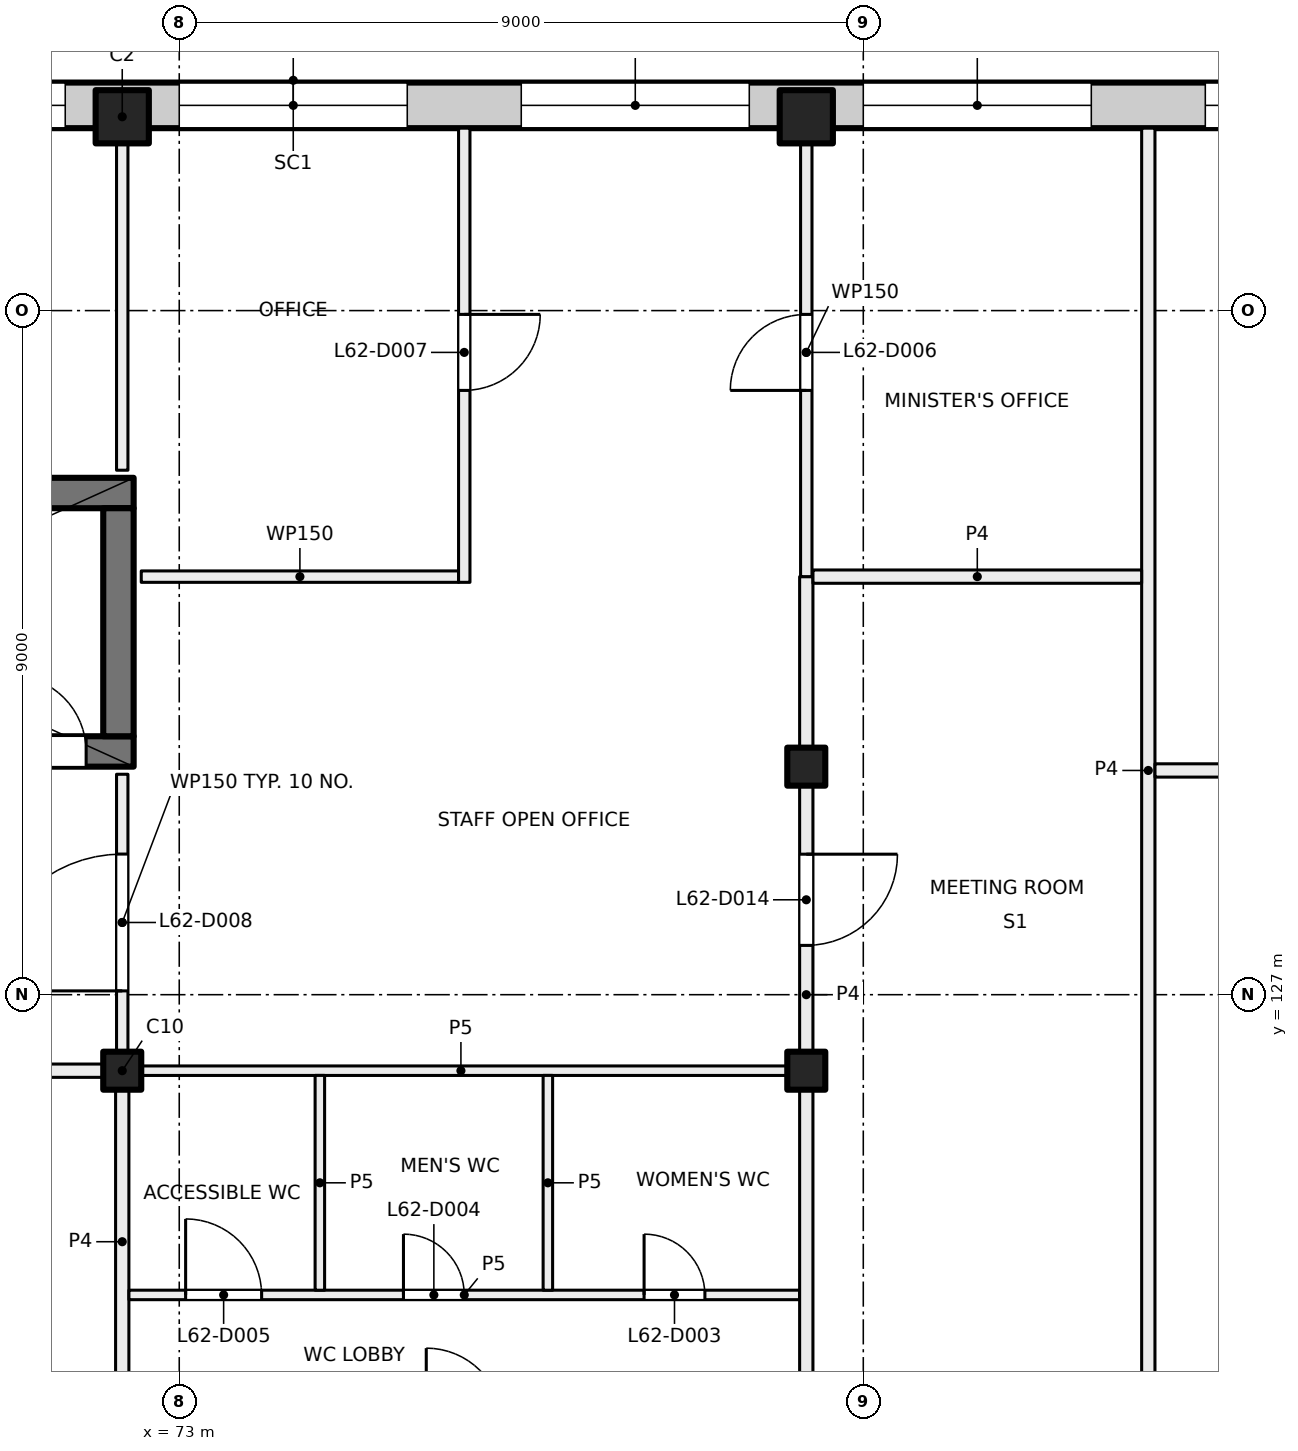
"""IFC4 building model, lengths in metres.
Left out: names, types, materials, properties, quantities, classifications, styles, units other than length and angle.
Written with IfcOpenShell. Run it as: python <this file> out.ifc"""

import sys

from ifc_helpers import new_model, si_unit, direction, frame, frame_2d, origin, origin_2d, place, context, subcontext, project, spatial, rectangle, extrude, element, fill, save


model = new_model("IFC4")
c1 = context("Model", 3, precision=1e-05, world=origin(), true_north=direction((0.0, 1.0)))
c2 = subcontext(c1, "Body", "Model", "MODEL_VIEW")
j1 = project(units=[si_unit("LENGTHUNIT", "METRE"), si_unit("PLANEANGLEUNIT", "RADIAN")], contexts=[c1])
p1 = place(None, origin())
s1 = spatial("IfcSite", under=j1, at=p1, CompositionType="ELEMENT")
p2 = place(p1, origin())
s2 = spatial("IfcBuilding", under=s1, at=p2, CompositionType="ELEMENT")
p3 = place(p2, frame((0.0, 0.0, 261.5)))
s3 = spatial("IfcBuildingStorey", under=s2, at=p3, CompositionType="ELEMENT", Elevation=261.5)
for number, where, z_axis, x_axis in (
    (1, (81.25, 130.0, 0.0), (0.0, 0.0, 1.0), (1.0, 0.0, 0.0)),
    (2, (72.25, 126.0, 0.0), (0.0, 0.0, 1.0), (1.0, 0.0, 0.0)),
    (3, (81.25, 126.0, 0.0), (0.0, 0.0, 1.0), (1.0, 0.0, 0.0)),
):
    element("IfcColumn", number, at=place(p3, frame(where, z_axis=z_axis, x_axis=x_axis)), inside=s3, PredefinedType="COLUMN", context=c2, shape_type="SweptSolid", body=[
        extrude(rectangle(XDim=0.5, YDim=0.5, at=origin_2d()), origin(), (0.0, 0.0, 1.0), 4.0),
    ])
for number, where, z_axis, x_axis in (
    (4, (72.25, 138.55, 0.0), (0.0, 0.0, 1.0), (1.0, 0.0, 0.0)),
    (5, (81.25, 138.55, 0.0), (0.0, 0.0, 1.0), (1.0, 0.0, 0.0)),
):
    element("IfcColumn", number, at=place(p3, frame(where, z_axis=z_axis, x_axis=x_axis)), inside=s3, PredefinedType="COLUMN", context=c2, shape_type="SweptSolid", body=[
        extrude(rectangle(XDim=0.7, YDim=0.7, at=origin_2d()), origin(), (0.0, 0.0, 1.0), 4.0),
    ])
p4 = place(p3, frame((63.5, 130.2, 0.0), z_axis=(0.0, 0.0, 1.0), x_axis=(1.0, 0.0, 0.0)))
e6 = element("IfcWall", 6, at=p4, inside=s3, PredefinedType="SHEAR", context=c2, shape_type="SweptSolid", body=[
    extrude(rectangle(XDim=8.9, YDim=0.4, at=frame_2d((4.45, 0.0))), origin(), (0.0, 0.0, 1.0), 4.0),
])
p5 = place(p4, frame((7.275, 0.0, 0.0)))
e7 = element("IfcOpeningElement", 7, at=p5, cuts=e6, PredefinedType="OPENING", context=c2, shape_type="SweptSolid", body=[
    extrude(rectangle(XDim=1.0, YDim=2.1, at=frame_2d((0.5, 1.05))), frame((0.0, 0.21, 0.0), z_axis=(0.0, -1.0, 0.0), x_axis=(1.0, 0.0, 0.0)), (0.0, 0.0, 1.0), 0.42),
])
p6 = place(p3, frame((64.0, 133.6, 0.0), z_axis=(0.0, 0.0, 1.0), x_axis=(1.0, 0.0, 0.0)))
e8 = element("IfcWall", 8, at=p6, inside=s3, PredefinedType="SHEAR", context=c2, shape_type="SweptSolid", body=[
    extrude(rectangle(XDim=8.4, YDim=0.4, at=frame_2d((4.2, 0.0))), origin(), (0.0, 0.0, 1.0), 4.0),
])
p7 = place(p3, frame((72.2, 130.4, 0.0), z_axis=(0.0, 0.0, 1.0), x_axis=(0.0, 1.0, 0.0)))
e9 = element("IfcWall", 9, at=p7, inside=s3, PredefinedType="SHEAR", context=c2, shape_type="SweptSolid", body=[
    extrude(rectangle(XDim=3.0, YDim=0.4, at=frame_2d((1.5, 0.0))), origin(), (0.0, 0.0, 1.0), 4.0),
])
p8 = place(p3, frame((47.07, 138.7, 0.0), z_axis=(0.0, 0.0, 1.0), x_axis=(1.0, 0.0, 0.0)))
e10 = element("IfcWall", 10, at=p8, inside=s3, PredefinedType="SOLIDWALL", context=c2, shape_type="SweptSolid", body=[
    extrude(rectangle(XDim=43.91, YDim=0.6, at=frame_2d((21.955, 0.0))), origin(), (0.0, 0.0, 1.0), 3.625),
])
p9 = place(p8, frame((3.43, 0.0, 0.9)))
e11 = element("IfcOpeningElement", 11, at=p9, cuts=e10, PredefinedType="OPENING", context=c2, shape_type="SweptSolid", body=[
    extrude(rectangle(XDim=3.0, YDim=2.4, at=frame_2d((1.5, 1.2))), frame((0.0, 0.31, 0.0), z_axis=(0.0, -1.0, 0.0), x_axis=(1.0, 0.0, 0.0)), (0.0, 0.0, 1.0), 0.62),
])
p10 = place(p8, frame((7.93, 0.0, 0.9)))
e12 = element("IfcOpeningElement", 12, at=p10, cuts=e10, PredefinedType="OPENING", context=c2, shape_type="SweptSolid", body=[
    extrude(rectangle(XDim=3.0, YDim=2.4, at=frame_2d((1.5, 1.2))), frame((0.0, 0.31, 0.0), z_axis=(0.0, -1.0, 0.0), x_axis=(1.0, 0.0, 0.0)), (0.0, 0.0, 1.0), 0.62),
])
p11 = place(p8, frame((12.43, 0.0, 0.9)))
e13 = element("IfcOpeningElement", 13, at=p11, cuts=e10, PredefinedType="OPENING", context=c2, shape_type="SweptSolid", body=[
    extrude(rectangle(XDim=3.0, YDim=2.4, at=frame_2d((1.5, 1.2))), frame((0.0, 0.31, 0.0), z_axis=(0.0, -1.0, 0.0), x_axis=(1.0, 0.0, 0.0)), (0.0, 0.0, 1.0), 0.62),
])
p12 = place(p8, frame((16.93, 0.0, 0.9)))
e14 = element("IfcOpeningElement", 14, at=p12, cuts=e10, PredefinedType="OPENING", context=c2, shape_type="SweptSolid", body=[
    extrude(rectangle(XDim=3.0, YDim=2.4, at=frame_2d((1.5, 1.2))), frame((0.0, 0.31, 0.0), z_axis=(0.0, -1.0, 0.0), x_axis=(1.0, 0.0, 0.0)), (0.0, 0.0, 1.0), 0.62),
])
p13 = place(p8, frame((21.43, 0.0, 0.9)))
e15 = element("IfcOpeningElement", 15, at=p13, cuts=e10, PredefinedType="OPENING", context=c2, shape_type="SweptSolid", body=[
    extrude(rectangle(XDim=3.0, YDim=2.4, at=frame_2d((1.5, 1.2))), frame((0.0, 0.31, 0.0), z_axis=(0.0, -1.0, 0.0), x_axis=(1.0, 0.0, 0.0)), (0.0, 0.0, 1.0), 0.62),
])
p14 = place(p8, frame((25.93, 0.0, 0.9)))
e16 = element("IfcOpeningElement", 16, at=p14, cuts=e10, PredefinedType="OPENING", context=c2, shape_type="SweptSolid", body=[
    extrude(rectangle(XDim=3.0, YDim=2.4, at=frame_2d((1.5, 1.2))), frame((0.0, 0.31, 0.0), z_axis=(0.0, -1.0, 0.0), x_axis=(1.0, 0.0, 0.0)), (0.0, 0.0, 1.0), 0.62),
])
p15 = place(p8, frame((30.43, 0.0, 0.9)))
e17 = element("IfcOpeningElement", 17, at=p15, cuts=e10, PredefinedType="OPENING", context=c2, shape_type="SweptSolid", body=[
    extrude(rectangle(XDim=3.0, YDim=2.4, at=frame_2d((1.5, 1.2))), frame((0.0, 0.31, 0.0), z_axis=(0.0, -1.0, 0.0), x_axis=(1.0, 0.0, 0.0)), (0.0, 0.0, 1.0), 0.62),
])
p16 = place(p8, frame((34.93, 0.0, 0.9)))
e18 = element("IfcOpeningElement", 18, at=p16, cuts=e10, PredefinedType="OPENING", context=c2, shape_type="SweptSolid", body=[
    extrude(rectangle(XDim=3.0, YDim=2.4, at=frame_2d((1.5, 1.2))), frame((0.0, 0.31, 0.0), z_axis=(0.0, -1.0, 0.0), x_axis=(1.0, 0.0, 0.0)), (0.0, 0.0, 1.0), 0.62),
])
p17 = place(p8, frame((39.43, 0.0, 0.9)))
e19 = element("IfcOpeningElement", 19, at=p17, cuts=e10, PredefinedType="OPENING", context=c2, shape_type="SweptSolid", body=[
    extrude(rectangle(XDim=3.0, YDim=2.4, at=frame_2d((1.5, 1.2))), frame((0.0, 0.31, 0.0), z_axis=(0.0, -1.0, 0.0), x_axis=(1.0, 0.0, 0.0)), (0.0, 0.0, 1.0), 0.62),
])
p18 = place(p3, frame((72.25, 121.5, 0.0), z_axis=(0.0, 0.0, 1.0), x_axis=(0.0, 1.0, 0.0)))
e20 = element("IfcWall", 20, at=p18, inside=s3, PredefinedType="PARTITIONING", context=c2, shape_type="SweptSolid", body=[
    extrude(rectangle(XDim=4.5, YDim=0.175, at=frame_2d((2.25, 0.0))), origin(), (0.0, 0.0, 1.0), 3.625),
])
p19 = place(p3, frame((72.338, 123.05, 0.0), z_axis=(0.0, 0.0, 1.0), x_axis=(1.0, 0.0, 0.0)))
e21 = element("IfcWall", 21, at=p19, inside=s3, PredefinedType="PARTITIONING", context=c2, shape_type="SweptSolid", body=[
    extrude(rectangle(XDim=8.824, YDim=0.125, at=frame_2d((4.412, 0.0))), origin(), (0.0, 0.0, 1.0), 3.625),
])
p20 = place(p19, frame((6.778, 0.0, 0.0)))
e22 = element("IfcOpeningElement", 22, at=p20, cuts=e21, PredefinedType="OPENING", context=c2, shape_type="SweptSolid", body=[
    extrude(rectangle(XDim=0.8, YDim=2.1, at=frame_2d((0.4, 1.05))), frame((0.0, 0.073, 0.0), z_axis=(0.0, -1.0, 0.0), x_axis=(1.0, 0.0, 0.0)), (0.0, 0.0, 1.0), 0.145),
])
p21 = place(p19, frame((3.612, 0.0, 0.0)))
e23 = element("IfcOpeningElement", 23, at=p21, cuts=e21, PredefinedType="OPENING", context=c2, shape_type="SweptSolid", body=[
    extrude(rectangle(XDim=0.8, YDim=2.1, at=frame_2d((0.4, 1.05))), frame((0.0, 0.073, 0.0), z_axis=(0.0, -1.0, 0.0), x_axis=(1.0, 0.0, 0.0)), (0.0, 0.0, 1.0), 0.145),
])
p22 = place(p19, frame((0.746, 0.0, 0.0)))
e24 = element("IfcOpeningElement", 24, at=p22, cuts=e21, PredefinedType="OPENING", context=c2, shape_type="SweptSolid", body=[
    extrude(rectangle(XDim=1.0, YDim=2.1, at=frame_2d((0.5, 1.05))), frame((0.0, 0.073, 0.0), z_axis=(0.0, -1.0, 0.0), x_axis=(1.0, 0.0, 0.0)), (0.0, 0.0, 1.0), 0.145),
])
p23 = place(p3, frame((72.25, 126.0, 0.0), z_axis=(0.0, 0.0, 1.0), x_axis=(-1.0, 0.0, 0.0)))
e25 = element("IfcWall", 25, at=p23, inside=s3, PredefinedType="PARTITIONING", context=c2, shape_type="SweptSolid", body=[
    extrude(rectangle(XDim=9.088, YDim=0.175, at=frame_2d((4.544, 0.0))), origin(), (0.0, 0.0, 1.0), 3.625),
])
p24 = place(p3, frame((72.25, 126.0, 0.0), z_axis=(0.0, 0.0, 1.0), x_axis=(0.0, 1.0, 0.0)))
e26 = element("IfcWall", 26, at=p24, inside=s3, PredefinedType="PARTITIONING", context=c2, shape_type="SweptSolid", body=[
    extrude(rectangle(XDim=3.9, YDim=0.15, at=frame_2d((1.95, 0.0))), origin(), (0.0, 0.0, 1.0), 3.625),
])
p25 = place(p24, frame((1.05, 0.0, 0.0)))
e27 = element("IfcOpeningElement", 27, at=p25, cuts=e26, PredefinedType="OPENING", context=c2, shape_type="SweptSolid", body=[
    extrude(rectangle(XDim=1.8, YDim=2.1, at=frame_2d((0.9, 1.05))), frame((0.0, 0.085, 0.0), z_axis=(0.0, -1.0, 0.0), x_axis=(1.0, 0.0, 0.0)), (0.0, 0.0, 1.0), 0.17),
])
p26 = place(p3, frame((72.25, 126.0, 0.0), z_axis=(0.0, 0.0, 1.0), x_axis=(1.0, 0.0, 0.0)))
e28 = element("IfcWall", 28, at=p26, inside=s3, PredefinedType="PARTITIONING", context=c2, shape_type="SweptSolid", body=[
    extrude(rectangle(XDim=8.912, YDim=0.125, at=frame_2d((4.456, 0.0))), origin(), (0.0, 0.0, 1.0), 3.625),
])
p27 = place(p3, frame((72.25, 133.9, 0.0), z_axis=(0.0, 0.0, 1.0), x_axis=(0.0, 1.0, 0.0)))
e29 = element("IfcWall", 29, at=p27, inside=s3, PredefinedType="PARTITIONING", context=c2, shape_type="SweptSolid", body=[
    extrude(rectangle(XDim=4.5, YDim=0.15, at=frame_2d((2.25, 0.0))), origin(), (0.0, 0.0, 1.0), 3.625),
])
p28 = place(p3, frame((74.85, 125.938, 0.0), z_axis=(0.0, 0.0, 1.0), x_axis=(0.0, -1.0, 0.0)))
e30 = element("IfcWall", 30, at=p28, inside=s3, PredefinedType="PARTITIONING", context=c2, shape_type="SweptSolid", body=[
    extrude(rectangle(XDim=2.826, YDim=0.125, at=frame_2d((1.413, 0.0))), origin(), (0.0, 0.0, 1.0), 3.625),
])
p29 = place(p3, frame((76.675, 132.5, 0.0), z_axis=(0.0, 0.0, 1.0), x_axis=(-1.0, 0.0, 0.0)))
e31 = element("IfcWall", 31, at=p29, inside=s3, PredefinedType="PARTITIONING", context=c2, shape_type="SweptSolid", body=[
    extrude(rectangle(XDim=4.175, YDim=0.15, at=frame_2d((2.087, 0.0))), origin(), (0.0, 0.0, 1.0), 3.625),
])
p30 = place(p3, frame((76.75, 138.4, 0.0), z_axis=(0.0, 0.0, 1.0), x_axis=(0.0, -1.0, 0.0)))
e32 = element("IfcWall", 32, at=p30, inside=s3, PredefinedType="PARTITIONING", context=c2, shape_type="SweptSolid", body=[
    extrude(rectangle(XDim=5.975, YDim=0.15, at=frame_2d((2.987, 0.0))), origin(), (0.0, 0.0, 1.0), 3.625),
])
p31 = place(p30, frame((2.45, 0.0, 0.0)))
e33 = element("IfcOpeningElement", 33, at=p31, cuts=e32, PredefinedType="OPENING", context=c2, shape_type="SweptSolid", body=[
    extrude(rectangle(XDim=1.0, YDim=2.1, at=frame_2d((0.5, 1.05))), frame((0.0, 0.085, 0.0), z_axis=(0.0, -1.0, 0.0), x_axis=(1.0, 0.0, 0.0)), (0.0, 0.0, 1.0), 0.17),
])
p32 = place(p3, frame((77.85, 125.938, 0.0), z_axis=(0.0, 0.0, 1.0), x_axis=(0.0, -1.0, 0.0)))
e34 = element("IfcWall", 34, at=p32, inside=s3, PredefinedType="PARTITIONING", context=c2, shape_type="SweptSolid", body=[
    extrude(rectangle(XDim=2.826, YDim=0.125, at=frame_2d((1.413, 0.0))), origin(), (0.0, 0.0, 1.0), 3.625),
])
p33 = place(p3, frame((81.25, 132.5, 0.0), z_axis=(0.0, 0.0, 1.0), x_axis=(0.0, -1.0, 0.0)))
e35 = element("IfcWall", 35, at=p33, inside=s3, PredefinedType="PARTITIONING", context=c2, shape_type="SweptSolid", body=[
    extrude(rectangle(XDim=11.0, YDim=0.175, at=frame_2d((5.5, 0.0))), origin(), (0.0, 0.0, 1.0), 3.625),
])
p34 = place(p33, frame((3.652, 0.0, 0.0)))
e36 = element("IfcOpeningElement", 36, at=p34, cuts=e35, PredefinedType="OPENING", context=c2, shape_type="SweptSolid", body=[
    extrude(rectangle(XDim=1.2, YDim=2.1, at=frame_2d((0.6, 1.05))), frame((0.0, 0.097, 0.0), z_axis=(0.0, -1.0, 0.0), x_axis=(1.0, 0.0, 0.0)), (0.0, 0.0, 1.0), 0.195),
])
p35 = place(p3, frame((81.25, 132.5, 0.0), z_axis=(0.0, 0.0, 1.0), x_axis=(0.0, 1.0, 0.0)))
e37 = element("IfcWall", 37, at=p35, inside=s3, PredefinedType="PARTITIONING", context=c2, shape_type="SweptSolid", body=[
    extrude(rectangle(XDim=5.9, YDim=0.15, at=frame_2d((2.95, 0.0))), origin(), (0.0, 0.0, 1.0), 3.625),
])
p36 = place(p35, frame((2.45, 0.0, 0.0)))
e38 = element("IfcOpeningElement", 38, at=p36, cuts=e37, PredefinedType="OPENING", context=c2, shape_type="SweptSolid", body=[
    extrude(rectangle(XDim=1.0, YDim=2.1, at=frame_2d((0.5, 1.05))), frame((0.0, 0.085, 0.0), z_axis=(0.0, -1.0, 0.0), x_axis=(1.0, 0.0, 0.0)), (0.0, 0.0, 1.0), 0.17),
])
p37 = place(p3, frame((85.75, 121.5, 0.0), z_axis=(0.0, 0.0, 1.0), x_axis=(0.0, 1.0, 0.0)))
e39 = element("IfcWall", 39, at=p37, inside=s3, PredefinedType="PARTITIONING", context=c2, shape_type="SweptSolid", body=[
    extrude(rectangle(XDim=16.9, YDim=0.175, at=frame_2d((8.45, 0.0))), origin(), (0.0, 0.0, 1.0), 3.625),
])
p38 = place(p3, frame((85.662, 132.5, 0.0), z_axis=(0.0, 0.0, 1.0), x_axis=(-1.0, 0.0, 0.0)))
e40 = element("IfcWall", 40, at=p38, inside=s3, PredefinedType="PARTITIONING", context=c2, shape_type="SweptSolid", body=[
    extrude(rectangle(XDim=4.324, YDim=0.175, at=frame_2d((2.162, 0.0))), origin(), (0.0, 0.0, 1.0), 3.625),
])
p39 = place(p3, frame((85.838, 129.95, 0.0), z_axis=(0.0, 0.0, 1.0), x_axis=(1.0, 0.0, 0.0)))
e41 = element("IfcWall", 41, at=p39, inside=s3, PredefinedType="PARTITIONING", context=c2, shape_type="SweptSolid", body=[
    extrude(rectangle(XDim=5.162, YDim=0.175, at=frame_2d((2.581, 0.0))), origin(), (0.0, 0.0, 1.0), 3.625),
])
p40 = place(p39, frame((1.971, 0.0, 0.0)))
e42 = element("IfcOpeningElement", 42, at=p40, cuts=e41, PredefinedType="OPENING", context=c2, shape_type="SweptSolid", body=[
    extrude(rectangle(XDim=1.2, YDim=2.1, at=frame_2d((0.6, 1.05))), frame((0.0, 0.097, 0.0), z_axis=(0.0, -1.0, 0.0), x_axis=(1.0, 0.0, 0.0)), (0.0, 0.0, 1.0), 0.195),
])
p41 = place(p13, origin())
e43 = element("IfcWindow", 43, at=p41, inside=s3, PartitioningType="SINGLE_PANEL", PredefinedType="WINDOW", context=c2, shape_type="SweptSolid", body=[
    extrude(rectangle(XDim=3.0, YDim=2.4, at=frame_2d((1.5, 1.2))), frame((0.0, 0.03, 0.0), z_axis=(0.0, -1.0, 0.0), x_axis=(1.0, 0.0, 0.0)), (0.0, 0.0, 1.0), 0.06),
])
fill(e15, e43)
p42 = place(p14, origin())
e44 = element("IfcWindow", 44, at=p42, inside=s3, PartitioningType="SINGLE_PANEL", PredefinedType="WINDOW", context=c2, shape_type="SweptSolid", body=[
    extrude(rectangle(XDim=3.0, YDim=2.4, at=frame_2d((1.5, 1.2))), frame((0.0, 0.03, 0.0), z_axis=(0.0, -1.0, 0.0), x_axis=(1.0, 0.0, 0.0)), (0.0, 0.0, 1.0), 0.06),
])
fill(e16, e44)
p43 = place(p15, origin())
e45 = element("IfcWindow", 45, at=p43, inside=s3, PartitioningType="SINGLE_PANEL", PredefinedType="WINDOW", context=c2, shape_type="SweptSolid", body=[
    extrude(rectangle(XDim=3.0, YDim=2.4, at=frame_2d((1.5, 1.2))), frame((0.0, 0.03, 0.0), z_axis=(0.0, -1.0, 0.0), x_axis=(1.0, 0.0, 0.0)), (0.0, 0.0, 1.0), 0.06),
])
fill(e17, e45)
p44 = place(p16, origin())
e46 = element("IfcWindow", 46, at=p44, inside=s3, PartitioningType="SINGLE_PANEL", PredefinedType="WINDOW", context=c2, shape_type="SweptSolid", body=[
    extrude(rectangle(XDim=3.0, YDim=2.4, at=frame_2d((1.5, 1.2))), frame((0.0, 0.03, 0.0), z_axis=(0.0, -1.0, 0.0), x_axis=(1.0, 0.0, 0.0)), (0.0, 0.0, 1.0), 0.06),
])
fill(e18, e46)
p45 = place(p17, origin())
e47 = element("IfcWindow", 47, at=p45, inside=s3, PartitioningType="SINGLE_PANEL", PredefinedType="WINDOW", context=c2, shape_type="SweptSolid", body=[
    extrude(rectangle(XDim=3.0, YDim=2.4, at=frame_2d((1.5, 1.2))), frame((0.0, 0.03, 0.0), z_axis=(0.0, -1.0, 0.0), x_axis=(1.0, 0.0, 0.0)), (0.0, 0.0, 1.0), 0.06),
])
fill(e19, e47)
p46 = place(p5, origin())
e48 = element("IfcDoor", 48, at=p46, inside=s3, OperationType="SINGLE_SWING_LEFT", PredefinedType="DOOR", context=c2, shape_type="SweptSolid", body=[
    extrude(rectangle(XDim=1.0, YDim=2.1, at=frame_2d((0.5, 1.05))), frame((0.0, 0.025, 0.0), z_axis=(0.0, -1.0, 0.0), x_axis=(1.0, 0.0, 0.0)), (0.0, 0.0, 1.0), 0.05),
])
fill(e7, e48)
p47 = place(p20, origin())
e49 = element("IfcDoor", 49, at=p47, inside=s3, OperationType="SINGLE_SWING_RIGHT", PredefinedType="DOOR", context=c2, shape_type="SweptSolid", body=[
    extrude(rectangle(XDim=0.8, YDim=2.1, at=frame_2d((0.4, 1.05))), frame((0.0, 0.025, 0.0), z_axis=(0.0, -1.0, 0.0), x_axis=(1.0, 0.0, 0.0)), (0.0, 0.0, 1.0), 0.05),
])
fill(e22, e49)
p48 = place(p21, origin())
e50 = element("IfcDoor", 50, at=p48, inside=s3, OperationType="SINGLE_SWING_LEFT", PredefinedType="DOOR", context=c2, shape_type="SweptSolid", body=[
    extrude(rectangle(XDim=0.8, YDim=2.1, at=frame_2d((0.4, 1.05))), frame((0.0, 0.025, 0.0), z_axis=(0.0, -1.0, 0.0), x_axis=(1.0, 0.0, 0.0)), (0.0, 0.0, 1.0), 0.05),
])
fill(e23, e50)
p49 = place(p22, origin())
e51 = element("IfcDoor", 51, at=p49, inside=s3, OperationType="SINGLE_SWING_LEFT", PredefinedType="DOOR", context=c2, shape_type="SweptSolid", body=[
    extrude(rectangle(XDim=1.0, YDim=2.1, at=frame_2d((0.5, 1.05))), frame((0.0, 0.025, 0.0), z_axis=(0.0, -1.0, 0.0), x_axis=(1.0, 0.0, 0.0)), (0.0, 0.0, 1.0), 0.05),
])
fill(e24, e51)
p50 = place(p36, origin())
e52 = element("IfcDoor", 52, at=p50, inside=s3, OperationType="SINGLE_SWING_LEFT", PredefinedType="DOOR", context=c2, shape_type="SweptSolid", body=[
    extrude(rectangle(XDim=1.0, YDim=2.1, at=frame_2d((0.5, 1.05))), frame((0.0, 0.025, 0.0), z_axis=(0.0, -1.0, 0.0), x_axis=(1.0, 0.0, 0.0)), (0.0, 0.0, 1.0), 0.05),
])
fill(e38, e52)
p51 = place(p31, origin())
e53 = element("IfcDoor", 53, at=p51, inside=s3, OperationType="SINGLE_SWING_LEFT", PredefinedType="DOOR", context=c2, shape_type="SweptSolid", body=[
    extrude(rectangle(XDim=1.0, YDim=2.1, at=frame_2d((0.5, 1.05))), frame((0.0, 0.025, 0.0), z_axis=(0.0, -1.0, 0.0), x_axis=(1.0, 0.0, 0.0)), (0.0, 0.0, 1.0), 0.05),
])
fill(e33, e53)
p52 = place(p25, origin())
e54 = element("IfcDoor", 54, at=p52, inside=s3, OperationType="DOUBLE_DOOR_SINGLE_SWING", PredefinedType="DOOR", context=c2, shape_type="SweptSolid", body=[
    extrude(rectangle(XDim=1.8, YDim=2.1, at=frame_2d((0.9, 1.05))), frame((0.0, 0.025, 0.0), z_axis=(0.0, -1.0, 0.0), x_axis=(1.0, 0.0, 0.0)), (0.0, 0.0, 1.0), 0.05),
])
fill(e27, e54)
p53 = place(p34, origin())
e55 = element("IfcDoor", 55, at=p53, inside=s3, OperationType="DOUBLE_DOOR_SINGLE_SWING", PredefinedType="DOOR", context=c2, shape_type="SweptSolid", body=[
    extrude(rectangle(XDim=1.2, YDim=2.1, at=frame_2d((0.6, 1.05))), frame((0.0, 0.025, 0.0), z_axis=(0.0, -1.0, 0.0), x_axis=(1.0, 0.0, 0.0)), (0.0, 0.0, 1.0), 0.05),
])
fill(e36, e55)
save(model, sys.argv[1])
